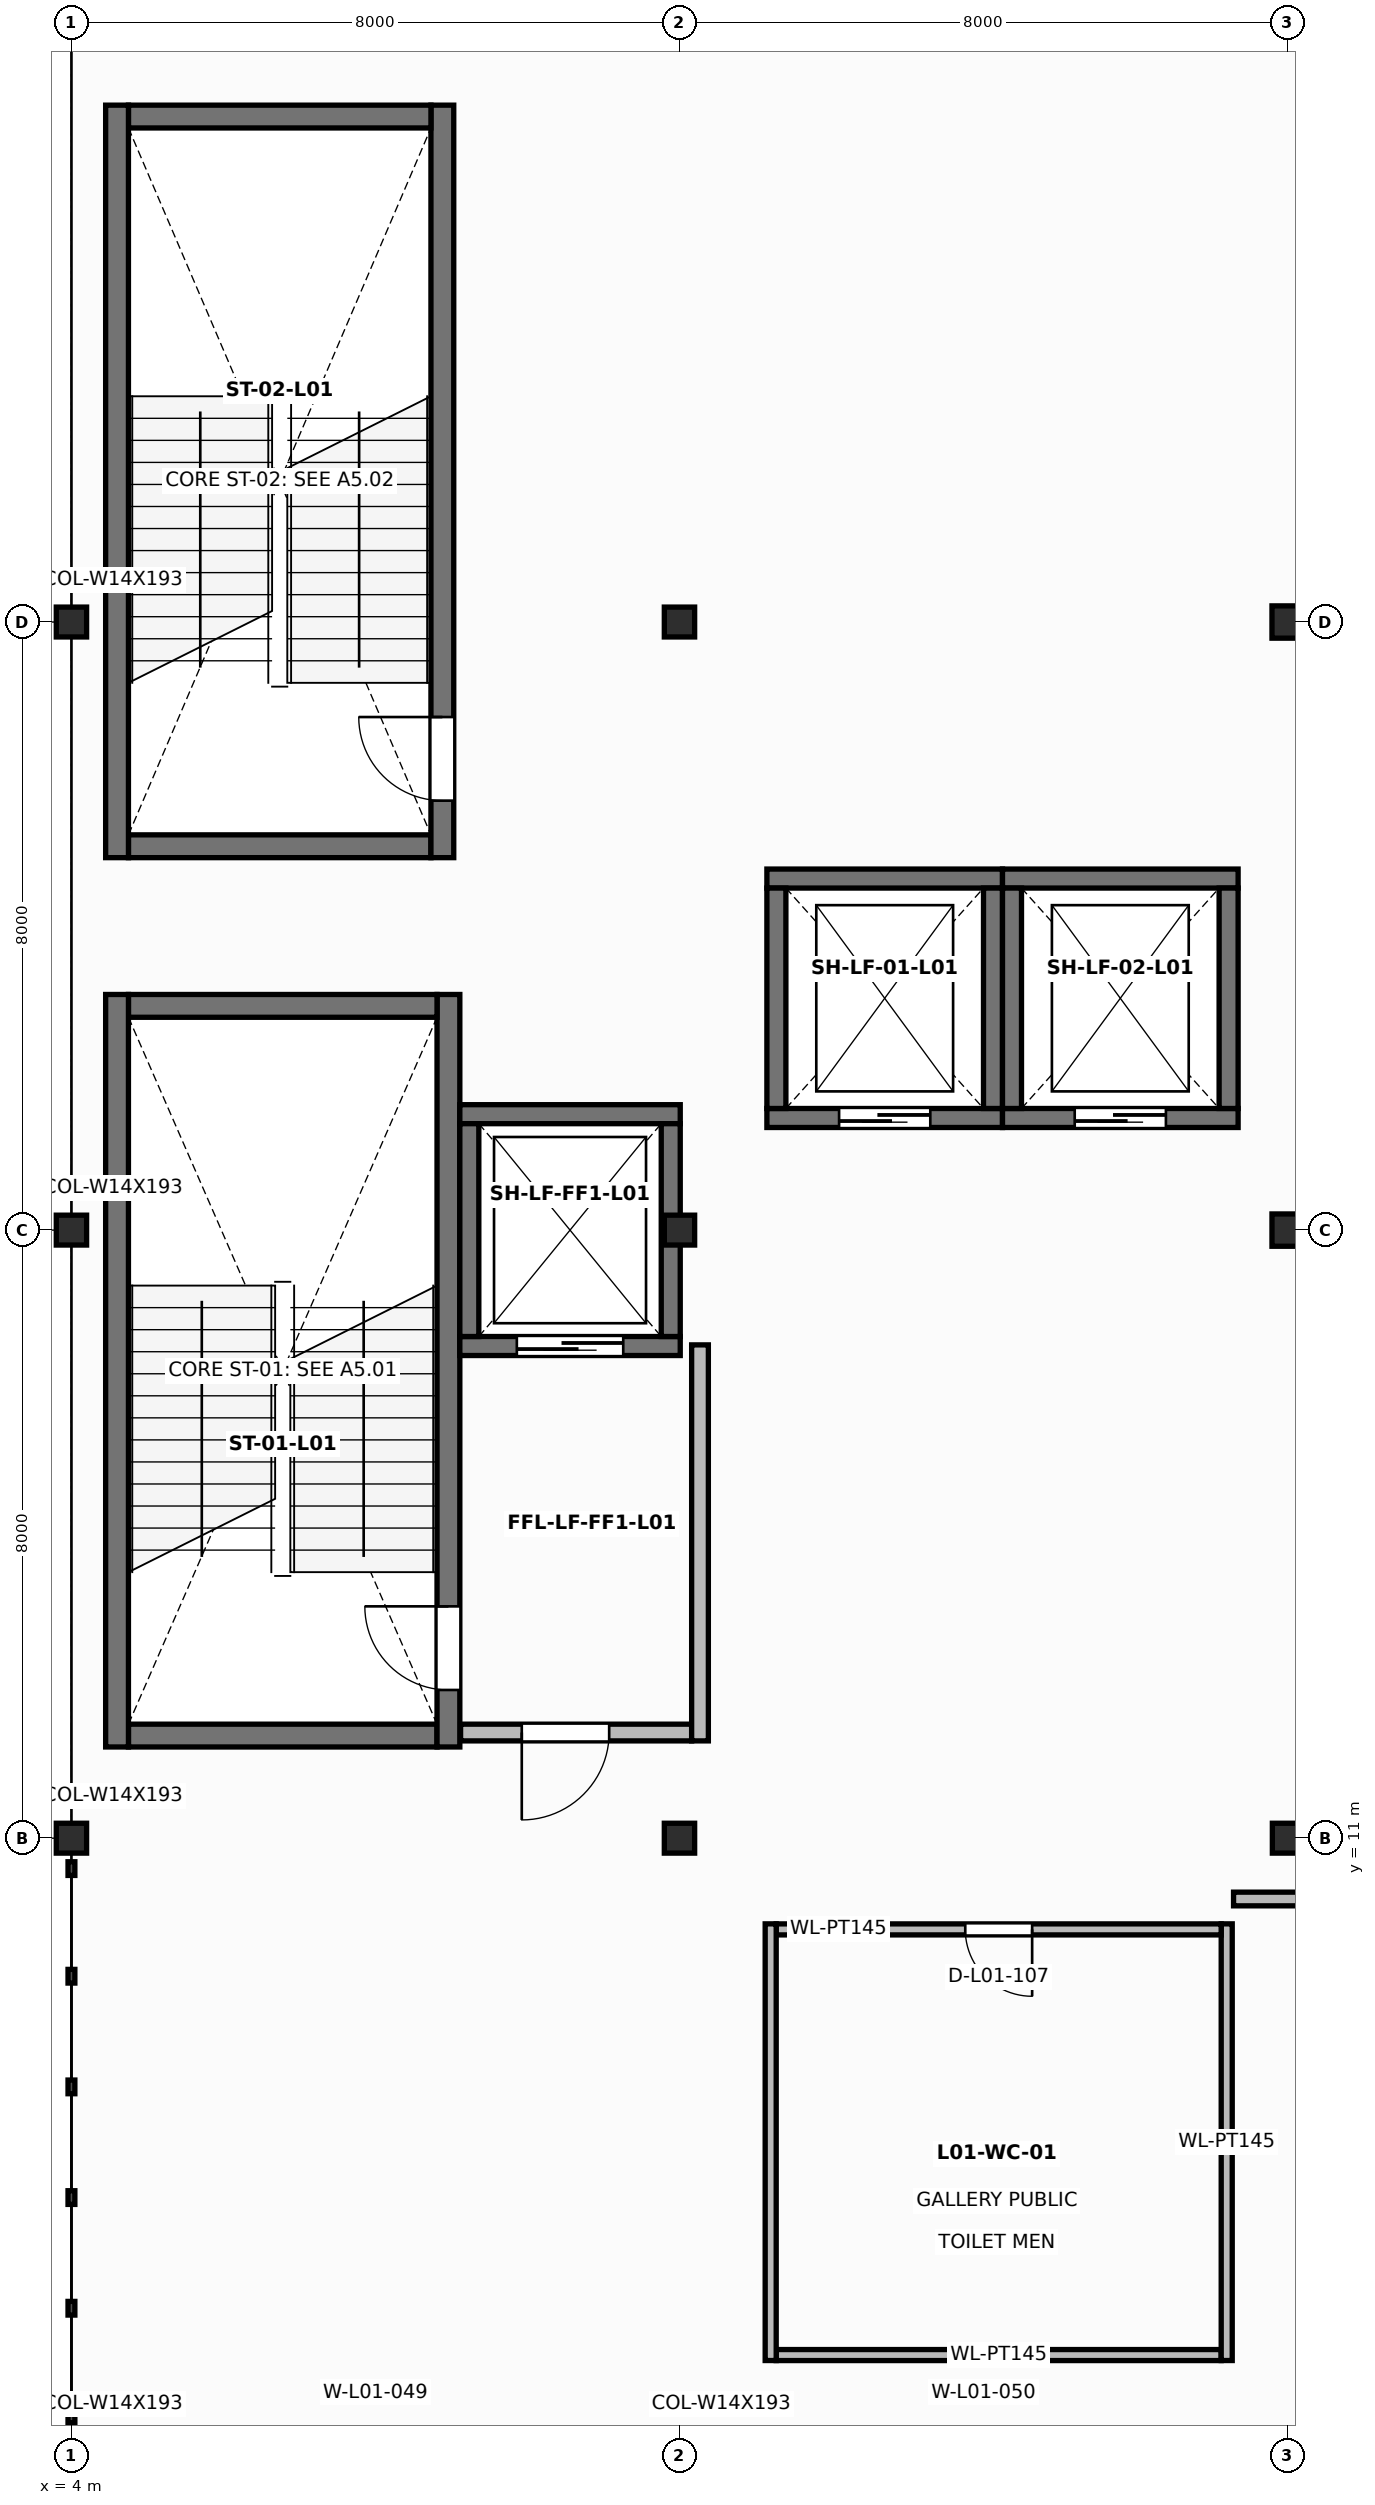
"""IFC4 building model, lengths in metres.
Left out: names, types, materials, properties, quantities, classifications, styles, units other than length and angle.
Written with IfcOpenShell. Run it as: python <this file> out.ifc"""

import sys

from ifc_helpers import new_model, si_unit, direction, frame, frame_2d, origin, origin_2d, place, context, subcontext, project, spatial, rectangle, i_section, extrude, element, fill, save


model = new_model("IFC4")
c1 = context("Model", 3, precision=1e-05, world=origin(), true_north=direction((0.0, 1.0)))
c2 = subcontext(c1, "Body", "Model", "MODEL_VIEW")
j1 = project(units=[si_unit("LENGTHUNIT", "METRE"), si_unit("PLANEANGLEUNIT", "RADIAN")], contexts=[c1])
p1 = place(None, origin())
s1 = spatial("IfcSite", under=j1, at=p1, CompositionType="ELEMENT")
p2 = place(p1, origin())
s2 = spatial("IfcBuilding", under=s1, at=p2, CompositionType="ELEMENT")
p3 = place(p2, frame((0.0, 0.0, 6.0)))
s3 = spatial("IfcBuildingStorey", under=s2, at=p3, CompositionType="ELEMENT", Elevation=6.0)
for number, where, z_axis, x_axis in (
    (1, (4.0, 11.0, 0.0), (0.0, 0.0, 1.0), (1.0, 0.0, 0.0)),
    (2, (4.0, 19.0, 0.0), (0.0, 0.0, 1.0), (1.0, 0.0, 0.0)),
    (3, (4.0, 27.0, 0.0), (0.0, 0.0, 1.0), (1.0, 0.0, 0.0)),
    (4, (12.0, 11.0, 0.0), (0.0, 0.0, 1.0), (1.0, 0.0, 0.0)),
    (5, (12.0, 19.0, 0.0), (0.0, 0.0, 1.0), (1.0, 0.0, 0.0)),
    (6, (12.0, 27.0, 0.0), (0.0, 0.0, 1.0), (1.0, 0.0, 0.0)),
    (7, (20.0, 11.0, 0.0), (0.0, 0.0, 1.0), (1.0, 0.0, 0.0)),
):
    element("IfcColumn", number, at=place(p3, frame(where, z_axis=z_axis, x_axis=x_axis)), inside=s3, PredefinedType="COLUMN", context=c2, shape_type="SweptSolid", body=[
        extrude(i_section(OverallWidth=0.399, OverallDepth=0.393, WebThickness=0.023, FlangeThickness=0.037, at=origin_2d()), origin(), (0.0, 0.0, 1.0), 5.2),
    ])
for number, where, z_axis, x_axis in (
    (8, (20.0, 19.0, 0.0), (0.0, 0.0, 1.0), (1.0, 0.0, 0.0)),
    (9, (20.0, 27.0, 0.0), (0.0, 0.0, 1.0), (1.0, 0.0, 0.0)),
):
    element("IfcColumn", number, at=place(p3, frame(where, z_axis=z_axis, x_axis=x_axis)), inside=s3, PredefinedType="COLUMN", context=c2, shape_type="SweptSolid", body=[
        extrude(i_section(OverallWidth=0.409, OverallDepth=0.425, WebThickness=0.033, FlangeThickness=0.052, at=origin_2d()), origin(), (0.0, 0.0, 1.0), 5.2),
    ])
p4 = place(p3, frame((4.75, 12.35, 0.0), z_axis=(0.0, 0.0, 1.0), x_axis=(1.0, 0.0, 0.0)))
e10 = element("IfcWall", 10, at=p4, inside=s3, PredefinedType="SHEAR", context=c2, shape_type="SweptSolid", body=[
    extrude(rectangle(XDim=4.06, YDim=0.3, at=frame_2d((2.03, 0.0))), origin(), (0.0, 0.0, 1.0), 4.945),
])
p5 = place(p3, frame((8.96, 12.2, 0.0), z_axis=(0.0, 0.0, 1.0), x_axis=(0.0, 1.0, 0.0)))
e11 = element("IfcWall", 11, at=p5, inside=s3, PredefinedType="SHEAR", context=c2, shape_type="SweptSolid", body=[
    extrude(rectangle(XDim=9.9, YDim=0.3, at=frame_2d((4.95, 0.0))), origin(), (0.0, 0.0, 1.0), 4.945),
])
p6 = place(p5, frame((0.75, 0.0, 0.0)))
e12 = element("IfcOpeningElement", 12, at=p6, cuts=e11, PredefinedType="OPENING", context=c2, shape_type="SweptSolid", body=[
    extrude(rectangle(XDim=1.1, YDim=2.15, at=frame_2d((0.55, 1.075))), frame((0.0, 0.16, 0.0), z_axis=(0.0, -1.0, 0.0), x_axis=(1.0, 0.0, 0.0)), (0.0, 0.0, 1.0), 0.32),
])
p7 = place(p3, frame((8.81, 21.95, 0.0), z_axis=(0.0, 0.0, 1.0), x_axis=(-1.0, 0.0, 0.0)))
e13 = element("IfcWall", 13, at=p7, inside=s3, PredefinedType="SHEAR", context=c2, shape_type="SweptSolid", body=[
    extrude(rectangle(XDim=4.06, YDim=0.3, at=frame_2d((2.03, 0.0))), origin(), (0.0, 0.0, 1.0), 4.945),
])
p8 = place(p3, frame((4.6, 22.1, 0.0), z_axis=(0.0, 0.0, 1.0), x_axis=(0.0, -1.0, 0.0)))
e14 = element("IfcWall", 14, at=p8, inside=s3, PredefinedType="SHEAR", context=c2, shape_type="SweptSolid", body=[
    extrude(rectangle(XDim=9.9, YDim=0.3, at=frame_2d((4.95, 0.0))), origin(), (0.0, 0.0, 1.0), 4.945),
])
p9 = place(p3, frame((4.75, 24.05, 0.0), z_axis=(0.0, 0.0, 1.0), x_axis=(1.0, 0.0, 0.0)))
e15 = element("IfcWall", 15, at=p9, inside=s3, PredefinedType="SHEAR", context=c2, shape_type="SweptSolid", body=[
    extrude(rectangle(XDim=3.98, YDim=0.3, at=frame_2d((1.99, 0.0))), origin(), (0.0, 0.0, 1.0), 4.945),
])
p10 = place(p3, frame((8.88, 23.9, 0.0), z_axis=(0.0, 0.0, 1.0), x_axis=(0.0, 1.0, 0.0)))
e16 = element("IfcWall", 16, at=p10, inside=s3, PredefinedType="SHEAR", context=c2, shape_type="SweptSolid", body=[
    extrude(rectangle(XDim=9.9, YDim=0.3, at=frame_2d((4.95, 0.0))), origin(), (0.0, 0.0, 1.0), 4.945),
])
p11 = place(p10, frame((0.75, 0.0, 0.0)))
e17 = element("IfcOpeningElement", 17, at=p11, cuts=e16, PredefinedType="OPENING", context=c2, shape_type="SweptSolid", body=[
    extrude(rectangle(XDim=1.1, YDim=2.15, at=frame_2d((0.55, 1.075))), frame((0.0, 0.16, 0.0), z_axis=(0.0, -1.0, 0.0), x_axis=(1.0, 0.0, 0.0)), (0.0, 0.0, 1.0), 0.32),
])
p12 = place(p3, frame((8.73, 33.65, 0.0), z_axis=(0.0, 0.0, 1.0), x_axis=(-1.0, 0.0, 0.0)))
e18 = element("IfcWall", 18, at=p12, inside=s3, PredefinedType="SHEAR", context=c2, shape_type="SweptSolid", body=[
    extrude(rectangle(XDim=3.98, YDim=0.3, at=frame_2d((1.99, 0.0))), origin(), (0.0, 0.0, 1.0), 4.945),
])
p13 = place(p3, frame((4.6, 33.8, 0.0), z_axis=(0.0, 0.0, 1.0), x_axis=(0.0, -1.0, 0.0)))
e19 = element("IfcWall", 19, at=p13, inside=s3, PredefinedType="SHEAR", context=c2, shape_type="SweptSolid", body=[
    extrude(rectangle(XDim=9.9, YDim=0.3, at=frame_2d((4.95, 0.0))), origin(), (0.0, 0.0, 1.0), 4.945),
])
p14 = place(p3, frame((9.11, 17.475, 0.0), z_axis=(0.0, 0.0, 1.0), x_axis=(1.0, 0.0, 0.0)))
e20 = element("IfcWall", 20, at=p14, inside=s3, PredefinedType="SOLIDWALL", context=c2, shape_type="SweptSolid", body=[
    extrude(rectangle(XDim=2.9, YDim=0.25, at=frame_2d((1.45, 0.0))), origin(), (0.0, 0.0, 1.0), 4.945),
])
p15 = place(p14, frame((0.75, 0.0, 0.0)))
e21 = element("IfcOpeningElement", 21, at=p15, cuts=e20, PredefinedType="OPENING", context=c2, shape_type="SweptSolid", body=[
    extrude(rectangle(XDim=1.4, YDim=2.25, at=frame_2d((0.7, 1.125))), frame((0.0, 0.135, 0.0), z_axis=(0.0, -1.0, 0.0), x_axis=(1.0, 0.0, 0.0)), (0.0, 0.0, 1.0), 0.27),
])
p16 = place(p3, frame((12.01, 20.525, 0.0), z_axis=(0.0, 0.0, 1.0), x_axis=(-1.0, 0.0, 0.0)))
e22 = element("IfcWall", 22, at=p16, inside=s3, PredefinedType="SOLIDWALL", context=c2, shape_type="SweptSolid", body=[
    extrude(rectangle(XDim=2.9, YDim=0.25, at=frame_2d((1.45, 0.0))), origin(), (0.0, 0.0, 1.0), 4.945),
])
for number, where, z_axis, x_axis in (
    (23, (11.885, 17.6, 0.0), (0.0, 0.0, 1.0), (0.0, 1.0, 0.0)),
    (24, (9.235, 20.4, 0.0), (0.0, 0.0, 1.0), (0.0, -1.0, 0.0)),
):
    element("IfcWall", number, at=place(p3, frame(where, z_axis=z_axis, x_axis=x_axis)), inside=s3, PredefinedType="SOLIDWALL", context=c2, shape_type="SweptSolid", body=[
        extrude(rectangle(XDim=2.8, YDim=0.25, at=frame_2d((1.4, 0.0))), origin(), (0.0, 0.0, 1.0), 4.945),
    ])
p17 = place(p3, frame((9.12, 12.39, 0.0), z_axis=(0.0, 0.0, 1.0), x_axis=(1.0, 0.0, 0.0)))
e25 = element("IfcWall", 25, at=p17, inside=s3, PredefinedType="SOLIDWALL", context=c2, shape_type="SweptSolid", body=[
    extrude(rectangle(XDim=3.04, YDim=0.22, at=frame_2d((1.52, 0.0))), origin(), (0.0, 0.0, 1.0), 4.327),
])
p18 = place(p17, frame((0.805, 0.0, 0.0)))
e26 = element("IfcOpeningElement", 26, at=p18, cuts=e25, PredefinedType="OPENING", context=c2, shape_type="SweptSolid", body=[
    extrude(rectangle(XDim=1.15, YDim=2.15, at=frame_2d((0.575, 1.075))), frame((0.0, 0.12, 0.0), z_axis=(0.0, -1.0, 0.0), x_axis=(1.0, 0.0, 0.0)), (0.0, 0.0, 1.0), 0.24),
])
p19 = place(p3, frame((12.27, 12.28, 0.0), z_axis=(0.0, 0.0, 1.0), x_axis=(0.0, 1.0, 0.0)))
e27 = element("IfcWall", 27, at=p19, inside=s3, PredefinedType="SOLIDWALL", context=c2, shape_type="SweptSolid", body=[
    extrude(rectangle(XDim=5.21, YDim=0.22, at=frame_2d((2.605, 0.0))), origin(), (0.0, 0.0, 1.0), 4.945),
])
p20 = place(p3, frame((13.15, 20.475, 0.0), z_axis=(0.0, 0.0, 1.0), x_axis=(1.0, 0.0, 0.0)))
e28 = element("IfcWall", 28, at=p20, inside=s3, PredefinedType="SOLIDWALL", context=c2, shape_type="SweptSolid", body=[
    extrude(rectangle(XDim=3.1, YDim=0.25, at=frame_2d((1.55, 0.0))), origin(), (0.0, 0.0, 1.0), 4.945),
])
p21 = place(p20, frame((0.95, 0.0, 0.0)))
e29 = element("IfcOpeningElement", 29, at=p21, cuts=e28, PredefinedType="OPENING", context=c2, shape_type="SweptSolid", body=[
    extrude(rectangle(XDim=1.2, YDim=2.2, at=frame_2d((0.6, 1.1))), frame((0.0, 0.135, 0.0), z_axis=(0.0, -1.0, 0.0), x_axis=(1.0, 0.0, 0.0)), (0.0, 0.0, 1.0), 0.27),
])
p22 = place(p3, frame((16.25, 23.625, 0.0), z_axis=(0.0, 0.0, 1.0), x_axis=(-1.0, 0.0, 0.0)))
e30 = element("IfcWall", 30, at=p22, inside=s3, PredefinedType="SOLIDWALL", context=c2, shape_type="SweptSolid", body=[
    extrude(rectangle(XDim=3.1, YDim=0.25, at=frame_2d((1.55, 0.0))), origin(), (0.0, 0.0, 1.0), 4.945),
])
for number, where, z_axis, x_axis in (
    (31, (16.125, 20.6, 0.0), (0.0, 0.0, 1.0), (0.0, 1.0, 0.0)),
    (32, (13.275, 23.5, 0.0), (0.0, 0.0, 1.0), (0.0, -1.0, 0.0)),
):
    element("IfcWall", number, at=place(p3, frame(where, z_axis=z_axis, x_axis=x_axis)), inside=s3, PredefinedType="SOLIDWALL", context=c2, shape_type="SweptSolid", body=[
        extrude(rectangle(XDim=2.9, YDim=0.25, at=frame_2d((1.45, 0.0))), origin(), (0.0, 0.0, 1.0), 4.945),
    ])
p23 = place(p3, frame((16.25, 20.475, 0.0), z_axis=(0.0, 0.0, 1.0), x_axis=(1.0, 0.0, 0.0)))
e33 = element("IfcWall", 33, at=p23, inside=s3, PredefinedType="SOLIDWALL", context=c2, shape_type="SweptSolid", body=[
    extrude(rectangle(XDim=3.1, YDim=0.25, at=frame_2d((1.55, 0.0))), origin(), (0.0, 0.0, 1.0), 4.945),
])
p24 = place(p23, frame((0.95, 0.0, 0.0)))
e34 = element("IfcOpeningElement", 34, at=p24, cuts=e33, PredefinedType="OPENING", context=c2, shape_type="SweptSolid", body=[
    extrude(rectangle(XDim=1.2, YDim=2.2, at=frame_2d((0.6, 1.1))), frame((0.0, 0.135, 0.0), z_axis=(0.0, -1.0, 0.0), x_axis=(1.0, 0.0, 0.0)), (0.0, 0.0, 1.0), 0.27),
])
p25 = place(p3, frame((19.35, 23.625, 0.0), z_axis=(0.0, 0.0, 1.0), x_axis=(-1.0, 0.0, 0.0)))
e35 = element("IfcWall", 35, at=p25, inside=s3, PredefinedType="SOLIDWALL", context=c2, shape_type="SweptSolid", body=[
    extrude(rectangle(XDim=3.1, YDim=0.25, at=frame_2d((1.55, 0.0))), origin(), (0.0, 0.0, 1.0), 4.945),
])
for number, where, z_axis, x_axis in (
    (36, (19.225, 20.6, 0.0), (0.0, 0.0, 1.0), (0.0, 1.0, 0.0)),
    (37, (16.375, 23.5, 0.0), (0.0, 0.0, 1.0), (0.0, -1.0, 0.0)),
):
    element("IfcWall", number, at=place(p3, frame(where, z_axis=z_axis, x_axis=x_axis)), inside=s3, PredefinedType="SOLIDWALL", context=c2, shape_type="SweptSolid", body=[
        extrude(rectangle(XDim=2.9, YDim=0.25, at=frame_2d((1.45, 0.0))), origin(), (0.0, 0.0, 1.0), 4.945),
    ])
p26 = place(p3, frame((19.29, 10.2, 0.0), z_axis=(0.0, 0.0, 1.0), x_axis=(1.0, 0.0, 0.0)))
e38 = element("IfcWall", 38, at=p26, inside=s3, PredefinedType="PARTITIONING", context=c2, shape_type="SweptSolid", body=[
    extrude(rectangle(XDim=0.91, YDim=0.18, at=frame_2d((0.455, 0.0))), origin(), (0.0, 0.0, 1.0), 4.327),
])
p27 = place(p3, frame((13.272, 4.2, 0.0), z_axis=(0.0, 0.0, 1.0), x_axis=(1.0, 0.0, 0.0)))
e39 = element("IfcWall", 39, at=p27, inside=s3, PredefinedType="PARTITIONING", context=c2, shape_type="SweptSolid", body=[
    extrude(rectangle(XDim=5.855, YDim=0.145, at=frame_2d((2.927, 0.0))), origin(), (0.0, 0.0, 1.0), 4.87),
])
p28 = place(p3, frame((19.2, 4.128, 0.0), z_axis=(0.0, 0.0, 1.0), x_axis=(0.0, 1.0, 0.0)))
e40 = element("IfcWall", 40, at=p28, inside=s3, PredefinedType="PARTITIONING", context=c2, shape_type="SweptSolid", body=[
    extrude(rectangle(XDim=5.745, YDim=0.145, at=frame_2d((2.873, 0.0))), origin(), (0.0, 0.0, 1.0), 4.87),
])
p29 = place(p3, frame((19.127, 9.8, 0.0), z_axis=(0.0, 0.0, 1.0), x_axis=(-1.0, 0.0, 0.0)))
e41 = element("IfcWall", 41, at=p29, inside=s3, PredefinedType="PARTITIONING", context=c2, shape_type="SweptSolid", body=[
    extrude(rectangle(XDim=5.855, YDim=0.145, at=frame_2d((2.927, 0.0))), origin(), (0.0, 0.0, 1.0), 4.87),
])
p30 = place(p29, frame((2.487, 0.0, 0.0)))
e42 = element("IfcOpeningElement", 42, at=p30, cuts=e41, PredefinedType="OPENING", context=c2, shape_type="SweptSolid", body=[
    extrude(rectangle(XDim=0.88, YDim=2.08, at=frame_2d((0.44, 1.04))), frame((0.0, 0.083, 0.0), z_axis=(0.0, -1.0, 0.0), x_axis=(1.0, 0.0, 0.0)), (0.0, 0.0, 1.0), 0.165),
])
p31 = place(p3, frame((13.2, 9.873, 0.0), z_axis=(0.0, 0.0, 1.0), x_axis=(0.0, -1.0, 0.0)))
e43 = element("IfcWall", 43, at=p31, inside=s3, PredefinedType="PARTITIONING", context=c2, shape_type="SweptSolid", body=[
    extrude(rectangle(XDim=5.745, YDim=0.145, at=frame_2d((2.873, 0.0))), origin(), (0.0, 0.0, 1.0), 4.87),
])
p32 = place(p6, origin())
e44 = element("IfcDoor", 44, at=p32, inside=s3, OperationType="SINGLE_SWING_RIGHT", PredefinedType="DOOR", context=c2, shape_type="SweptSolid", body=[
    extrude(rectangle(XDim=1.1, YDim=2.15, at=frame_2d((0.55, 1.075))), frame((0.0, 0.025, 0.0), z_axis=(0.0, -1.0, 0.0), x_axis=(1.0, 0.0, 0.0)), (0.0, 0.0, 1.0), 0.05),
])
fill(e12, e44)
p33 = place(p11, origin())
e45 = element("IfcDoor", 45, at=p33, inside=s3, OperationType="SINGLE_SWING_RIGHT", PredefinedType="DOOR", context=c2, shape_type="SweptSolid", body=[
    extrude(rectangle(XDim=1.1, YDim=2.15, at=frame_2d((0.55, 1.075))), frame((0.0, 0.025, 0.0), z_axis=(0.0, -1.0, 0.0), x_axis=(1.0, 0.0, 0.0)), (0.0, 0.0, 1.0), 0.05),
])
fill(e17, e45)
p34 = place(p15, frame((1.4, 0.0, 0.0), z_axis=(0.0, 0.0, 1.0), x_axis=(-1.0, 0.0, 0.0)))
e46 = element("IfcDoor", 46, at=p34, inside=s3, OperationType="DOUBLE_DOOR_SLIDING", PredefinedType="DOOR", context=c2, shape_type="SweptSolid", body=[
    extrude(rectangle(XDim=1.4, YDim=2.25, at=frame_2d((0.7, 1.125))), frame((0.0, 0.025, 0.0), z_axis=(0.0, -1.0, 0.0), x_axis=(1.0, 0.0, 0.0)), (0.0, 0.0, 1.0), 0.05),
])
fill(e21, e46)
p35 = place(p18, frame((1.15, 0.0, 0.0), z_axis=(0.0, 0.0, 1.0), x_axis=(-1.0, 0.0, 0.0)))
e47 = element("IfcDoor", 47, at=p35, inside=s3, OperationType="SINGLE_SWING_LEFT", PredefinedType="DOOR", context=c2, shape_type="SweptSolid", body=[
    extrude(rectangle(XDim=1.15, YDim=2.15, at=frame_2d((0.575, 1.075))), frame((0.0, 0.025, 0.0), z_axis=(0.0, -1.0, 0.0), x_axis=(1.0, 0.0, 0.0)), (0.0, 0.0, 1.0), 0.05),
])
fill(e26, e47)
p36 = place(p21, frame((1.2, 0.0, 0.0), z_axis=(0.0, 0.0, 1.0), x_axis=(-1.0, 0.0, 0.0)))
e48 = element("IfcDoor", 48, at=p36, inside=s3, OperationType="DOUBLE_DOOR_SLIDING", PredefinedType="DOOR", context=c2, shape_type="SweptSolid", body=[
    extrude(rectangle(XDim=1.2, YDim=2.2, at=frame_2d((0.6, 1.1))), frame((0.0, 0.025, 0.0), z_axis=(0.0, -1.0, 0.0), x_axis=(1.0, 0.0, 0.0)), (0.0, 0.0, 1.0), 0.05),
])
fill(e29, e48)
p37 = place(p24, frame((1.2, 0.0, 0.0), z_axis=(0.0, 0.0, 1.0), x_axis=(-1.0, 0.0, 0.0)))
e49 = element("IfcDoor", 49, at=p37, inside=s3, OperationType="DOUBLE_DOOR_SLIDING", PredefinedType="DOOR", context=c2, shape_type="SweptSolid", body=[
    extrude(rectangle(XDim=1.2, YDim=2.2, at=frame_2d((0.6, 1.1))), frame((0.0, 0.025, 0.0), z_axis=(0.0, -1.0, 0.0), x_axis=(1.0, 0.0, 0.0)), (0.0, 0.0, 1.0), 0.05),
])
fill(e34, e49)
p38 = place(p30, origin())
e50 = element("IfcDoor", 50, at=p38, inside=s3, OperationType="SINGLE_SWING_LEFT", PredefinedType="DOOR", context=c2, shape_type="SweptSolid", body=[
    extrude(rectangle(XDim=0.88, YDim=2.08, at=frame_2d((0.44, 1.04))), frame((0.0, 0.025, 0.0), z_axis=(0.0, -1.0, 0.0), x_axis=(1.0, 0.0, 0.0)), (0.0, 0.0, 1.0), 0.05),
])
fill(e42, e50)
save(model, sys.argv[1])
